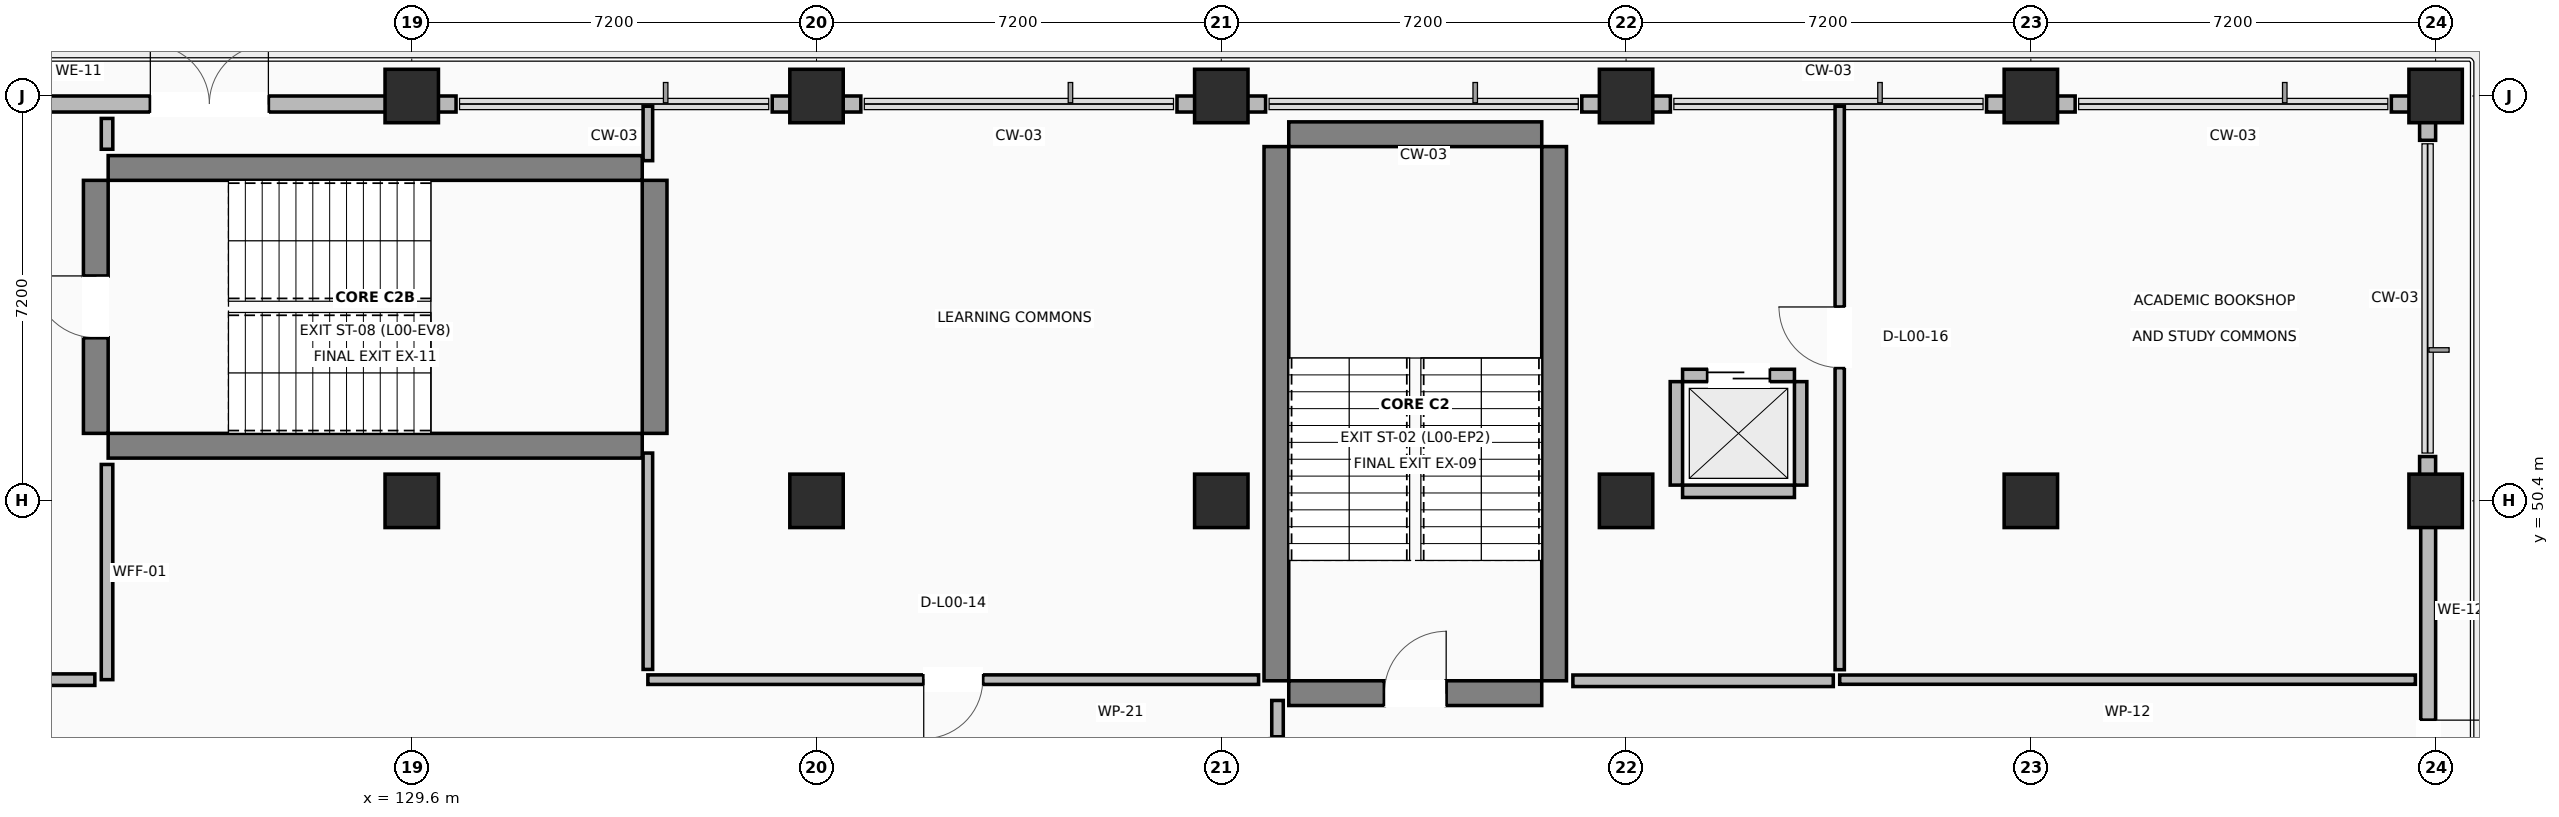
"""IFC4 building model, lengths in metres.
Left out: names, types, materials, properties, quantities, classifications, styles, units other than length and angle.
Written with IfcOpenShell. Run it as: python <this file> out.ifc"""

import sys

from ifc_helpers import new_model, si_unit, direction, frame, frame_2d, origin, origin_2d, place, context, subcontext, project, spatial, rectangle, extrude, element, fill, save


model = new_model("IFC4")
c1 = context("Model", 3, precision=1e-05, world=origin(), true_north=direction((0.0, 1.0)))
c2 = subcontext(c1, "Body", "Model", "MODEL_VIEW")
j1 = project(units=[si_unit("LENGTHUNIT", "METRE"), si_unit("PLANEANGLEUNIT", "RADIAN")], contexts=[c1])
p1 = place(None, origin())
s1 = spatial("IfcSite", under=j1, at=p1, CompositionType="ELEMENT")
p2 = place(p1, origin())
s2 = spatial("IfcBuilding", under=s1, at=p2, CompositionType="ELEMENT")
p3 = place(p2, origin())
s3 = spatial("IfcBuildingStorey", under=s2, at=p3, CompositionType="ELEMENT", Elevation=0.0)
for number, where, z_axis, x_axis in (
    (1, (129.6, 50.4, 0.0), (0.0, 0.0, 1.0), (1.0, 0.0, 0.0)),
    (2, (129.6, 57.6, 0.0), (0.0, 0.0, 1.0), (1.0, 0.0, 0.0)),
    (3, (136.8, 50.4, 0.0), (0.0, 0.0, 1.0), (1.0, 0.0, 0.0)),
    (4, (136.8, 57.6, 0.0), (0.0, 0.0, 1.0), (1.0, 0.0, 0.0)),
    (5, (144.0, 50.4, 0.0), (0.0, 0.0, 1.0), (1.0, 0.0, 0.0)),
    (6, (144.0, 57.6, 0.0), (0.0, 0.0, 1.0), (1.0, 0.0, 0.0)),
    (7, (151.2, 50.4, 0.0), (0.0, 0.0, 1.0), (1.0, 0.0, 0.0)),
    (8, (151.2, 57.6, 0.0), (0.0, 0.0, 1.0), (1.0, 0.0, 0.0)),
    (9, (158.4, 50.4, 0.0), (0.0, 0.0, 1.0), (1.0, 0.0, 0.0)),
    (10, (158.4, 57.6, 0.0), (0.0, 0.0, 1.0), (1.0, 0.0, 0.0)),
    (11, (165.6, 50.4, 0.0), (0.0, 0.0, 1.0), (1.0, 0.0, 0.0)),
    (12, (165.6, 57.6, 0.0), (0.0, 0.0, 1.0), (1.0, 0.0, 0.0)),
):
    element("IfcColumn", number, at=place(p3, frame(where, z_axis=z_axis, x_axis=x_axis)), inside=s3, PredefinedType="COLUMN", context=c2, shape_type="SweptSolid", body=[
        extrude(rectangle(XDim=0.95, YDim=0.95, at=origin_2d()), origin(), (0.0, 0.0, 1.0), 4.22),
    ])
p4 = place(p3, frame((145.2, 46.98, 0.0), z_axis=(0.0, 0.0, 1.0), x_axis=(1.0, 0.0, 0.0)))
e13 = element("IfcWall", 13, at=p4, inside=s3, PredefinedType="SHEAR", context=c2, shape_type="SweptSolid", body=[
    extrude(rectangle(XDim=4.5, YDim=0.44, at=frame_2d((2.25, 0.0))), origin(), (0.0, 0.0, 1.0), 4.22),
])
p5 = place(p4, frame((1.7, 0.0, 0.0)))
e14 = element("IfcOpeningElement", 14, at=p5, cuts=e13, PredefinedType="OPENING", context=c2, shape_type="SweptSolid", body=[
    extrude(rectangle(XDim=1.1, YDim=2.15, at=frame_2d((0.55, 1.075))), frame((0.0, 0.23, 0.0), z_axis=(0.0, -1.0, 0.0), x_axis=(1.0, 0.0, 0.0)), (0.0, 0.0, 1.0), 0.46),
])
p6 = place(p3, frame((145.2, 56.92, 0.0), z_axis=(0.0, 0.0, 1.0), x_axis=(1.0, 0.0, 0.0)))
e15 = element("IfcWall", 15, at=p6, inside=s3, PredefinedType="SHEAR", context=c2, shape_type="SweptSolid", body=[
    extrude(rectangle(XDim=4.5, YDim=0.44, at=frame_2d((2.25, 0.0))), origin(), (0.0, 0.0, 1.0), 4.22),
])
for number, where, z_axis, x_axis in (
    (16, (144.98, 47.2, 0.0), (0.0, 0.0, 1.0), (0.0, 1.0, 0.0)),
    (17, (149.92, 47.2, 0.0), (0.0, 0.0, 1.0), (0.0, 1.0, 0.0)),
    (18, (124.2, 51.38, 0.0), (0.0, 0.0, 1.0), (1.0, 0.0, 0.0)),
    (19, (124.2, 56.32, 0.0), (0.0, 0.0, 1.0), (1.0, 0.0, 0.0)),
):
    element("IfcWall", number, at=place(p3, frame(where, z_axis=z_axis, x_axis=x_axis)), inside=s3, PredefinedType="SHEAR", context=c2, shape_type="SweptSolid", body=[
        extrude(rectangle(XDim=9.5, YDim=0.44, at=frame_2d((4.75, 0.0))), origin(), (0.0, 0.0, 1.0), 4.22),
    ])
p7 = place(p3, frame((123.98, 51.6, 0.0), z_axis=(0.0, 0.0, 1.0), x_axis=(0.0, 1.0, 0.0)))
e20 = element("IfcWall", 20, at=p7, inside=s3, PredefinedType="SHEAR", context=c2, shape_type="SweptSolid", body=[
    extrude(rectangle(XDim=4.5, YDim=0.44, at=frame_2d((2.25, 0.0))), origin(), (0.0, 0.0, 1.0), 4.22),
])
p8 = place(p7, frame((1.7, 0.0, 0.0)))
e21 = element("IfcOpeningElement", 21, at=p8, cuts=e20, PredefinedType="OPENING", context=c2, shape_type="SweptSolid", body=[
    extrude(rectangle(XDim=1.1, YDim=2.15, at=frame_2d((0.55, 1.075))), frame((0.0, 0.23, 0.0), z_axis=(0.0, -1.0, 0.0), x_axis=(1.0, 0.0, 0.0)), (0.0, 0.0, 1.0), 0.46),
])
p9 = place(p3, frame((133.92, 51.6, 0.0), z_axis=(0.0, 0.0, 1.0), x_axis=(0.0, 1.0, 0.0)))
e22 = element("IfcWall", 22, at=p9, inside=s3, PredefinedType="SHEAR", context=c2, shape_type="SweptSolid", body=[
    extrude(rectangle(XDim=4.5, YDim=0.44, at=frame_2d((2.25, 0.0))), origin(), (0.0, 0.0, 1.0), 4.22),
])
p10 = place(p3, frame((165.468, 50.4, 0.0), z_axis=(0.0, 0.0, 1.0), x_axis=(0.0, -1.0, 0.0)))
e23 = element("IfcWall", 23, at=p10, inside=s3, PredefinedType="STANDARD", context=c2, shape_type="SweptSolid", body=[
    extrude(rectangle(XDim=7.2, YDim=0.265, at=frame_2d((3.6, 0.0))), origin(), (0.0, 0.0, 1.0), 2.6),
])
p11 = place(p10, frame((3.9, 0.0, 0.0)))
e24 = element("IfcOpeningElement", 24, at=p11, cuts=e23, PredefinedType="OPENING", context=c2, shape_type="SweptSolid", body=[
    extrude(rectangle(XDim=2.1, YDim=2.3, at=frame_2d((1.05, 1.15))), frame((0.0, 0.142, 0.0), z_axis=(0.0, -1.0, 0.0), x_axis=(1.0, 0.0, 0.0)), (0.0, 0.0, 1.0), 0.285),
])
p12 = place(p3, frame((165.458, 50.4, 0.0), z_axis=(0.0, 0.0, 1.0), x_axis=(0.0, 1.0, 0.0)))
e25 = element("IfcWall", 25, at=p12, inside=s3, PredefinedType="STANDARD", context=c2, shape_type="SweptSolid", body=[
    extrude(rectangle(XDim=0.788, YDim=0.285, at=frame_2d((0.394, 0.0))), origin(), (0.0, 0.0, 1.0), 2.6),
])
p13 = place(p3, frame((165.458, 56.812, 0.0), z_axis=(0.0, 0.0, 1.0), x_axis=(0.0, 1.0, 0.0)))
e26 = element("IfcWall", 26, at=p13, inside=s3, PredefinedType="STANDARD", context=c2, shape_type="SweptSolid", body=[
    extrude(rectangle(XDim=0.503, YDim=0.285, at=frame_2d((0.251, 0.0))), origin(), (0.0, 0.0, 1.0), 2.6),
])
p14 = place(p3, frame((122.4, 57.458, 0.0), z_axis=(0.0, 0.0, 1.0), x_axis=(1.0, 0.0, 0.0)))
e27 = element("IfcWall", 27, at=p14, inside=s3, PredefinedType="STANDARD", context=c2, shape_type="SweptSolid", body=[
    extrude(rectangle(XDim=7.2, YDim=0.285, at=frame_2d((3.6, 0.0))), origin(), (0.0, 0.0, 1.0), 2.6),
])
p15 = place(p14, frame((2.55, 0.0, 0.0)))
e28 = element("IfcOpeningElement", 28, at=p15, cuts=e27, PredefinedType="OPENING", context=c2, shape_type="SweptSolid", body=[
    extrude(rectangle(XDim=2.1, YDim=2.3, at=frame_2d((1.05, 1.15))), frame((0.0, 0.152, 0.0), z_axis=(0.0, -1.0, 0.0), x_axis=(1.0, 0.0, 0.0)), (0.0, 0.0, 1.0), 0.305),
])
p16 = place(p3, frame((165.6, 57.458, 0.0), z_axis=(0.0, 0.0, 1.0), x_axis=(-1.0, 0.0, 0.0)))
e29 = element("IfcWall", 29, at=p16, inside=s3, PredefinedType="STANDARD", context=c2, shape_type="SweptSolid", body=[
    extrude(rectangle(XDim=0.788, YDim=0.285, at=frame_2d((0.394, 0.0))), origin(), (0.0, 0.0, 1.0), 2.6),
])
for number, where, z_axis, x_axis in (
    (30, (159.188, 57.458, 0.0), (0.0, 0.0, 1.0), (-1.0, 0.0, 0.0)),
    (31, (151.988, 57.458, 0.0), (0.0, 0.0, 1.0), (-1.0, 0.0, 0.0)),
):
    element("IfcWall", number, at=place(p3, frame(where, z_axis=z_axis, x_axis=x_axis)), inside=s3, PredefinedType="STANDARD", context=c2, shape_type="SweptSolid", body=[
        extrude(rectangle(XDim=1.576, YDim=0.285, at=frame_2d((0.788, 0.0))), origin(), (0.0, 0.0, 1.0), 2.6),
    ])
p17 = place(p3, frame((144.788, 57.458, 0.0), z_axis=(0.0, 0.0, 1.0), x_axis=(-1.0, 0.0, 0.0)))
e32 = element("IfcWall", 32, at=p17, inside=s3, PredefinedType="STANDARD", context=c2, shape_type="SweptSolid", body=[
    extrude(rectangle(XDim=1.576, YDim=0.285, at=frame_2d((0.788, 0.0))), origin(), (0.0, 0.0, 1.0), 2.6),
])
p18 = place(p3, frame((137.588, 57.458, 0.0), z_axis=(0.0, 0.0, 1.0), x_axis=(-1.0, 0.0, 0.0)))
e33 = element("IfcWall", 33, at=p18, inside=s3, PredefinedType="STANDARD", context=c2, shape_type="SweptSolid", body=[
    extrude(rectangle(XDim=1.576, YDim=0.285, at=frame_2d((0.788, 0.0))), origin(), (0.0, 0.0, 1.0), 2.6),
])
p19 = place(p3, frame((130.388, 57.458, 0.0), z_axis=(0.0, 0.0, 1.0), x_axis=(-1.0, 0.0, 0.0)))
e34 = element("IfcWall", 34, at=p19, inside=s3, PredefinedType="STANDARD", context=c2, shape_type="SweptSolid", body=[
    extrude(rectangle(XDim=0.788, YDim=0.285, at=frame_2d((0.394, 0.0))), origin(), (0.0, 0.0, 1.0), 2.6),
])
p20 = place(p3, frame((152.205, 50.57, 0.0), z_axis=(0.0, 0.0, 1.0), x_axis=(1.0, 0.0, 0.0)))
e35 = element("IfcWall", 35, at=p20, inside=s3, PredefinedType="STANDARD", context=c2, shape_type="SweptSolid", body=[
    extrude(rectangle(XDim=1.99, YDim=0.22, at=frame_2d((0.995, 0.0))), origin(), (0.0, 0.0, 1.0), 2.6),
])
p21 = place(p3, frame((152.205, 52.63, 0.0), z_axis=(0.0, 0.0, 1.0), x_axis=(1.0, 0.0, 0.0)))
e36 = element("IfcWall", 36, at=p21, inside=s3, PredefinedType="STANDARD", context=c2, shape_type="SweptSolid", body=[
    extrude(rectangle(XDim=1.99, YDim=0.22, at=frame_2d((0.995, 0.0))), origin(), (0.0, 0.0, 1.0), 2.6),
])
p22 = place(p21, frame((0.445, 0.0, 0.0)))
e37 = element("IfcOpeningElement", 37, at=p22, cuts=e36, PredefinedType="OPENING", context=c2, shape_type="SweptSolid", body=[
    extrude(rectangle(XDim=1.1, YDim=2.15, at=frame_2d((0.55, 1.075))), frame((0.0, 0.12, 0.0), z_axis=(0.0, -1.0, 0.0), x_axis=(1.0, 0.0, 0.0)), (0.0, 0.0, 1.0), 0.24),
])
for number, where, z_axis, x_axis in (
    (38, (152.095, 50.68, 0.0), (0.0, 0.0, 1.0), (0.0, 1.0, 0.0)),
    (39, (154.305, 50.68, 0.0), (0.0, 0.0, 1.0), (0.0, 1.0, 0.0)),
):
    element("IfcWall", number, at=place(p3, frame(where, z_axis=z_axis, x_axis=x_axis)), inside=s3, PredefinedType="STANDARD", context=c2, shape_type="SweptSolid", body=[
        extrude(rectangle(XDim=1.84, YDim=0.22, at=frame_2d((0.92, 0.0))), origin(), (0.0, 0.0, 1.0), 2.6),
    ])
p23 = place(p3, frame((144.663, 47.22, 0.0), z_axis=(0.0, 0.0, 1.0), x_axis=(-1.0, 0.0, 0.0)))
e40 = element("IfcWall", 40, at=p23, inside=s3, PredefinedType="PARTITIONING", context=c2, shape_type="SweptSolid", body=[
    extrude(rectangle(XDim=10.863, YDim=0.17, at=frame_2d((5.432, 0.0))), origin(), (0.0, 0.0, 1.0), 2.6),
])
p24 = place(p23, frame((4.906, 0.0, 0.0)))
e41 = element("IfcOpeningElement", 41, at=p24, cuts=e40, PredefinedType="OPENING", context=c2, shape_type="SweptSolid", body=[
    extrude(rectangle(XDim=1.05, YDim=2.15, at=frame_2d((0.525, 1.075))), frame((0.0, 0.095, 0.0), z_axis=(0.0, -1.0, 0.0), x_axis=(1.0, 0.0, 0.0)), (0.0, 0.0, 1.0), 0.19),
])
p25 = place(p3, frame((133.8, 47.402, 0.0), z_axis=(0.0, 0.0, 1.0), x_axis=(0.0, 1.0, 0.0)))
e42 = element("IfcWall", 42, at=p25, inside=s3, PredefinedType="PARTITIONING", context=c2, shape_type="SweptSolid", body=[
    extrude(rectangle(XDim=3.848, YDim=0.17, at=frame_2d((1.924, 0.0))), origin(), (0.0, 0.0, 1.0), 2.6),
])
p26 = place(p3, frame((133.8, 56.45, 0.0), z_axis=(0.0, 0.0, 1.0), x_axis=(0.0, 1.0, 0.0)))
e43 = element("IfcWall", 43, at=p26, inside=s3, PredefinedType="PARTITIONING", context=c2, shape_type="SweptSolid", body=[
    extrude(rectangle(XDim=0.968, YDim=0.17, at=frame_2d((0.484, 0.0))), origin(), (0.0, 0.0, 1.0), 2.6),
])
p27 = place(p3, frame((165.24, 47.22, 0.0), z_axis=(0.0, 0.0, 1.0), x_axis=(-1.0, 0.0, 0.0)))
e44 = element("IfcWall", 44, at=p27, inside=s3, PredefinedType="PARTITIONING", context=c2, shape_type="SweptSolid", body=[
    extrude(rectangle(XDim=10.24, YDim=0.165, at=frame_2d((5.12, 0.0))), origin(), (0.0, 0.0, 1.0), 2.6),
])
p28 = place(p3, frame((155.0, 47.397, 0.0), z_axis=(0.0, 0.0, 1.0), x_axis=(0.0, 1.0, 0.0)))
e45 = element("IfcWall", 45, at=p28, inside=s3, PredefinedType="PARTITIONING", context=c2, shape_type="SweptSolid", body=[
    extrude(rectangle(XDim=10.021, YDim=0.165, at=frame_2d((5.01, 0.0))), origin(), (0.0, 0.0, 1.0), 2.6),
])
p29 = place(p28, frame((5.371, 0.0, 0.0)))
e46 = element("IfcOpeningElement", 46, at=p29, cuts=e45, PredefinedType="OPENING", context=c2, shape_type="SweptSolid", body=[
    extrude(rectangle(XDim=1.08, YDim=2.15, at=frame_2d((0.54, 1.075))), frame((0.0, 0.093, 0.0), z_axis=(0.0, -1.0, 0.0), x_axis=(1.0, 0.0, 0.0)), (0.0, 0.0, 1.0), 0.185),
])
p30 = place(p3, frame((124.18, 57.201, 0.0), z_axis=(0.0, 0.0, 1.0), x_axis=(0.0, -1.0, 0.0)))
e47 = element("IfcWall", 47, at=p30, inside=s3, PredefinedType="PARTITIONING", context=c2, shape_type="SweptSolid", body=[
    extrude(rectangle(XDim=0.548, YDim=0.205, at=frame_2d((0.274, 0.0))), origin(), (0.0, 0.0, 1.0), 2.6),
])
p31 = place(p3, frame((124.18, 51.047, 0.0), z_axis=(0.0, 0.0, 1.0), x_axis=(0.0, -1.0, 0.0)))
e48 = element("IfcWall", 48, at=p31, inside=s3, PredefinedType="PARTITIONING", context=c2, shape_type="SweptSolid", body=[
    extrude(rectangle(XDim=3.827, YDim=0.205, at=frame_2d((1.914, 0.0))), origin(), (0.0, 0.0, 1.0), 2.6),
])
p32 = place(p3, frame((123.963, 47.22, 0.0), z_axis=(0.0, 0.0, 1.0), x_axis=(-1.0, 0.0, 0.0)))
e49 = element("IfcWall", 49, at=p32, inside=s3, PredefinedType="PARTITIONING", context=c2, shape_type="SweptSolid", body=[
    extrude(rectangle(XDim=2.958, YDim=0.205, at=frame_2d((1.479, 0.0))), origin(), (0.0, 0.0, 1.0), 2.6),
])
p33 = place(p32, frame((0.879, 0.0, 0.0)))
e50 = element("IfcOpeningElement", 50, at=p33, cuts=e49, PredefinedType="OPENING", context=c2, shape_type="SweptSolid", body=[
    extrude(rectangle(XDim=1.2, YDim=2.15, at=frame_2d((0.6, 1.075))), frame((0.0, 0.113, 0.0), z_axis=(0.0, -1.0, 0.0), x_axis=(1.0, 0.0, 0.0)), (0.0, 0.0, 1.0), 0.225),
])
p34 = place(p3, frame((145.0, 44.357, 0.0), z_axis=(0.0, 0.0, 1.0), x_axis=(0.0, 1.0, 0.0)))
e51 = element("IfcWall", 51, at=p34, inside=s3, PredefinedType="PARTITIONING", context=c2, shape_type="SweptSolid", body=[
    extrude(rectangle(XDim=2.493, YDim=0.205, at=frame_2d((1.247, 0.0))), origin(), (0.0, 0.0, 1.0), 2.6),
])
p35 = place(p34, frame((0.647, 0.0, 0.0)))
e52 = element("IfcOpeningElement", 52, at=p35, cuts=e51, PredefinedType="OPENING", context=c2, shape_type="SweptSolid", body=[
    extrude(rectangle(XDim=1.2, YDim=2.15, at=frame_2d((0.6, 1.075))), frame((0.0, 0.113, 0.0), z_axis=(0.0, -1.0, 0.0), x_axis=(1.0, 0.0, 0.0)), (0.0, 0.0, 1.0), 0.225),
])
p36 = place(p3, frame((150.254, 47.2, 0.0), z_axis=(0.0, 0.0, 1.0), x_axis=(1.0, 0.0, 0.0)))
e53 = element("IfcWall", 53, at=p36, inside=s3, PredefinedType="PARTITIONING", context=c2, shape_type="SweptSolid", body=[
    extrude(rectangle(XDim=4.632, YDim=0.205, at=frame_2d((2.316, 0.0))), origin(), (0.0, 0.0, 1.0), 2.6),
])
p37 = place(p11, origin())
e54 = element("IfcDoor", 54, at=p37, inside=s3, OperationType="DOUBLE_DOOR_SINGLE_SWING", PredefinedType="DOOR", context=c2, shape_type="SweptSolid", body=[
    extrude(rectangle(XDim=2.1, YDim=2.3, at=frame_2d((1.05, 1.15))), frame((0.0, 0.025, 0.0), z_axis=(0.0, -1.0, 0.0), x_axis=(1.0, 0.0, 0.0)), (0.0, 0.0, 1.0), 0.05),
])
fill(e24, e54)
p38 = place(p15, origin())
e55 = element("IfcDoor", 55, at=p38, inside=s3, OperationType="DOUBLE_DOOR_SINGLE_SWING", PredefinedType="DOOR", context=c2, shape_type="SweptSolid", body=[
    extrude(rectangle(XDim=2.1, YDim=2.3, at=frame_2d((1.05, 1.15))), frame((0.0, 0.025, 0.0), z_axis=(0.0, -1.0, 0.0), x_axis=(1.0, 0.0, 0.0)), (0.0, 0.0, 1.0), 0.05),
])
fill(e28, e55)
p39 = place(p5, origin())
e56 = element("IfcDoor", 56, at=p39, inside=s3, OperationType="SINGLE_SWING_RIGHT", PredefinedType="DOOR", context=c2, shape_type="SweptSolid", body=[
    extrude(rectangle(XDim=1.1, YDim=2.15, at=frame_2d((0.55, 1.075))), frame((0.0, 0.025, 0.0), z_axis=(0.0, -1.0, 0.0), x_axis=(1.0, 0.0, 0.0)), (0.0, 0.0, 1.0), 0.05),
])
fill(e14, e56)
p40 = place(p8, origin())
e57 = element("IfcDoor", 57, at=p40, inside=s3, OperationType="SINGLE_SWING_RIGHT", PredefinedType="DOOR", context=c2, shape_type="SweptSolid", body=[
    extrude(rectangle(XDim=1.1, YDim=2.15, at=frame_2d((0.55, 1.075))), frame((0.0, 0.025, 0.0), z_axis=(0.0, -1.0, 0.0), x_axis=(1.0, 0.0, 0.0)), (0.0, 0.0, 1.0), 0.05),
])
fill(e21, e57)
p41 = place(p22, origin())
e58 = element("IfcDoor", 58, at=p41, inside=s3, OperationType="SLIDING_TO_RIGHT", PredefinedType="DOOR", context=c2, shape_type="SweptSolid", body=[
    extrude(rectangle(XDim=1.1, YDim=2.15, at=frame_2d((0.55, 1.075))), frame((0.0, 0.025, 0.0), z_axis=(0.0, -1.0, 0.0), x_axis=(1.0, 0.0, 0.0)), (0.0, 0.0, 1.0), 0.05),
])
fill(e37, e58)
p42 = place(p24, origin())
e59 = element("IfcDoor", 59, at=p42, inside=s3, OperationType="SINGLE_SWING_RIGHT", PredefinedType="DOOR", context=c2, shape_type="SweptSolid", body=[
    extrude(rectangle(XDim=1.05, YDim=2.15, at=frame_2d((0.525, 1.075))), frame((0.0, 0.025, 0.0), z_axis=(0.0, -1.0, 0.0), x_axis=(1.0, 0.0, 0.0)), (0.0, 0.0, 1.0), 0.05),
])
fill(e41, e59)
p43 = place(p29, origin())
e60 = element("IfcDoor", 60, at=p43, inside=s3, OperationType="SINGLE_SWING_RIGHT", PredefinedType="DOOR", context=c2, shape_type="SweptSolid", body=[
    extrude(rectangle(XDim=1.08, YDim=2.15, at=frame_2d((0.54, 1.075))), frame((0.0, 0.025, 0.0), z_axis=(0.0, -1.0, 0.0), x_axis=(1.0, 0.0, 0.0)), (0.0, 0.0, 1.0), 0.05),
])
fill(e46, e60)
p44 = place(p35, origin())
e61 = element("IfcDoor", 61, at=p44, inside=s3, OperationType="SINGLE_SWING_LEFT", PredefinedType="DOOR", context=c2, shape_type="SweptSolid", body=[
    extrude(rectangle(XDim=1.2, YDim=2.15, at=frame_2d((0.6, 1.075))), frame((0.0, 0.025, 0.0), z_axis=(0.0, -1.0, 0.0), x_axis=(1.0, 0.0, 0.0)), (0.0, 0.0, 1.0), 0.05),
])
fill(e52, e61)
save(model, sys.argv[1])
